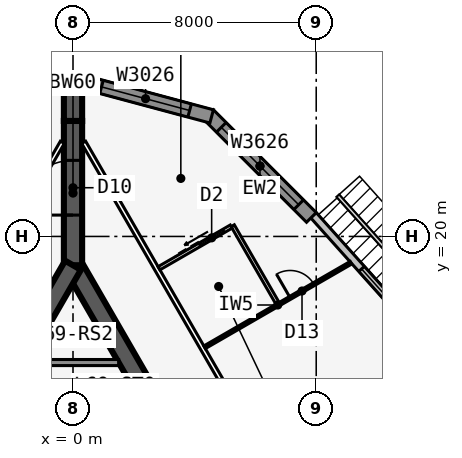
"""IFC4 building model, lengths in metres.
Left out: names, types, materials, properties, quantities, classifications, styles, units other than length and angle.
Written with IfcOpenShell. Run it as: python <this file> out.ifc"""

import sys

from ifc_helpers import new_model, si_unit, direction, frame, frame_2d, origin, place, context, subcontext, project, spatial, polyline, rectangle, outline, extrude, element, fill, save


model = new_model("IFC4")
c1 = context("Model", 3, precision=1e-05, world=origin(), true_north=direction((0.0, 1.0)))
c2 = subcontext(c1, "Body", "Model", "MODEL_VIEW")
j1 = project(units=[si_unit("LENGTHUNIT", "METRE"), si_unit("PLANEANGLEUNIT", "RADIAN")], contexts=[c1])
p1 = place(None, origin())
s1 = spatial("IfcSite", under=j1, at=p1, CompositionType="ELEMENT")
p2 = place(p1, origin())
s2 = spatial("IfcBuilding", under=s1, at=p2, CompositionType="ELEMENT")
p3 = place(p2, frame((0.0, 0.0, 260.9)))
s3 = spatial("IfcBuildingStorey", under=s2, at=p3, CompositionType="ELEMENT", Elevation=260.9)
p4 = place(p3, frame((16.5, -9.526, 0.0), z_axis=(0.0, 0.0, 1.0), x_axis=(-0.499999749417, 0.866025548458, 0.0)))
e1 = element("IfcWall", 1, at=p4, inside=s3, PredefinedType="SHEAR", context=c2, shape_type="SweptSolid", body=[
    extrude(rectangle(XDim=33.0, YDim=0.6, at=frame_2d((16.5, 0.0))), origin(), (0.0, 0.0, 1.0), 3.6),
])
p5 = place(p4, frame((14.15, 0.0, 0.0)))
e2 = element("IfcOpeningElement", 2, at=p5, cuts=e1, PredefinedType="OPENING", context=c2, shape_type="SweptSolid", body=[
    extrude(rectangle(XDim=1.8, YDim=2.13, at=frame_2d((0.9, 1.065))), frame((0.0, 0.31, 0.0), z_axis=(0.0, -1.0, 0.0), x_axis=(1.0, 0.0, 0.0)), (0.0, 0.0, 1.0), 0.62),
])
p6 = place(p4, frame((12.6, 0.0, 0.0)))
e3 = element("IfcOpeningElement", 3, at=p6, cuts=e1, PredefinedType="OPENING", context=c2, shape_type="SweptSolid", body=[
    extrude(rectangle(XDim=1.0, YDim=2.13, at=frame_2d((0.5, 1.065))), frame((0.0, 0.31, 0.0), z_axis=(0.0, -1.0, 0.0), x_axis=(1.0, 0.0, 0.0)), (0.0, 0.0, 1.0), 0.62),
])
p7 = place(p3, frame((0.0, 19.052, 0.0), z_axis=(0.0, 0.0, 1.0), x_axis=(-0.499999749417, -0.866025548458, 0.0)))
e4 = element("IfcWall", 4, at=p7, inside=s3, PredefinedType="SHEAR", context=c2, shape_type="SweptSolid", body=[
    extrude(rectangle(XDim=33.0, YDim=0.6, at=frame_2d((16.5, 0.0))), origin(), (0.0, 0.0, 1.0), 3.6),
])
p8 = place(p7, frame((14.15, 0.0, 0.0)))
e5 = element("IfcOpeningElement", 5, at=p8, cuts=e4, PredefinedType="OPENING", context=c2, shape_type="SweptSolid", body=[
    extrude(rectangle(XDim=1.8, YDim=2.13, at=frame_2d((0.9, 1.065))), frame((0.0, 0.31, 0.0), z_axis=(0.0, -1.0, 0.0), x_axis=(1.0, 0.0, 0.0)), (0.0, 0.0, 1.0), 0.62),
])
p9 = place(p7, frame((12.6, 0.0, 0.0)))
e6 = element("IfcOpeningElement", 6, at=p9, cuts=e4, PredefinedType="OPENING", context=c2, shape_type="SweptSolid", body=[
    extrude(rectangle(XDim=1.0, YDim=2.13, at=frame_2d((0.5, 1.065))), frame((0.0, 0.31, 0.0), z_axis=(0.0, -1.0, 0.0), x_axis=(1.0, 0.0, 0.0)), (0.0, 0.0, 1.0), 0.62),
])
p10 = place(p3, frame((0.0, 19.052, 0.0), z_axis=(0.0, 0.0, 1.0), x_axis=(0.0, 1.0, 0.0)))
e7 = element("IfcWall", 7, at=p10, inside=s3, PredefinedType="SHEAR", context=c2, shape_type="SweptSolid", body=[
    extrude(rectangle(XDim=4.746, YDim=0.6, at=frame_2d((2.373, 0.0))), origin(), (0.0, 0.0, 1.0), 3.6),
])
p11 = place(p10, frame((1.65, 0.0, 0.0)))
e8 = element("IfcOpeningElement", 8, at=p11, cuts=e7, PredefinedType="OPENING", context=c2, shape_type="SweptSolid", body=[
    extrude(rectangle(XDim=1.8, YDim=2.13, at=frame_2d((0.9, 1.065))), frame((0.0, 0.31, 0.0), z_axis=(0.0, -1.0, 0.0), x_axis=(1.0, 0.0, 0.0)), (0.0, 0.0, 1.0), 0.62),
])
p12 = place(p3, frame((0.0, 23.799, 0.0), z_axis=(0.0, 0.0, 1.0), x_axis=(0.0, 1.0, 0.0)))
e9 = element("IfcWall", 9, at=p12, inside=s3, PredefinedType="SHEAR", context=c2, shape_type="SweptSolid", body=[
    extrude(rectangle(XDim=1.155, YDim=0.6, at=frame_2d((0.577, 0.0))), origin(), (0.0, 0.0, 1.0), 3.6),
])
p13 = place(p3, frame((12.68, 15.374, 0.0), z_axis=(0.0, 0.0, 1.0), x_axis=(-0.667303550892, 0.744785855778, 0.0)))
e10 = element("IfcWall", 10, at=p13, inside=s3, PredefinedType="STANDARD", context=c2, shape_type="SweptSolid", body=[
    extrude(rectangle(XDim=7.153, YDim=0.25, at=frame_2d((3.576, 0.0))), origin(), (0.0, 0.0, 1.0), 3.435),
])
p14 = place(p13, frame((0.577, 0.0, 0.45)))
e11 = element("IfcOpeningElement", 11, at=p14, cuts=e10, PredefinedType="OPENING", context=c2, shape_type="SweptSolid", body=[
    extrude(rectangle(XDim=4.2, YDim=2.6, at=frame_2d((2.1, 1.3))), frame((0.0, 0.135, 0.0), z_axis=(0.0, -1.0, 0.0), x_axis=(1.0, 0.0, 0.0)), (0.0, 0.0, 1.0), 0.27),
])
p15 = place(p3, frame((7.841, 20.625, 0.0), z_axis=(0.0, 0.0, 1.0), x_axis=(-0.707106781187, 0.707106781187, 0.0)))
e12 = element("IfcWall", 12, at=p15, inside=s3, PredefinedType="SOLIDWALL", context=c2, shape_type="SweptSolid", body=[
    extrude(rectangle(XDim=4.781, YDim=0.45, at=frame_2d((2.391, 0.0))), origin(), (0.0, 0.0, 1.0), 3.435),
])
p16 = place(p15, frame((0.591, 0.0, 0.45)))
e13 = element("IfcOpeningElement", 13, at=p16, cuts=e12, PredefinedType="OPENING", context=c2, shape_type="SweptSolid", body=[
    extrude(rectangle(XDim=3.6, YDim=2.6, at=frame_2d((1.8, 1.3))), frame((0.0, 0.235, 0.0), z_axis=(0.0, -1.0, 0.0), x_axis=(1.0, 0.0, 0.0)), (0.0, 0.0, 1.0), 0.47),
])
p17 = place(p3, frame((4.561, 23.948, 0.0), z_axis=(0.0, 0.0, 1.0), x_axis=(-0.965926628191, 0.258816052347, 0.0)))
e14 = element("IfcWall", 14, at=p17, inside=s3, PredefinedType="SOLIDWALL", context=c2, shape_type="SweptSolid", body=[
    extrude(outline(polyline([(4.781, 0.225), (4.722, 0.225), (4.375, 0.132), (4.351, 0.225), (0.0, 0.225), (0.0, -0.225), (4.781, -0.225), (4.781, 0.225)])), origin(), (0.0, 0.0, 1.0), 3.435),
])
p18 = place(p17, frame((0.75, 0.0, 0.45)))
e15 = element("IfcOpeningElement", 15, at=p18, cuts=e14, PredefinedType="OPENING", context=c2, shape_type="SweptSolid", body=[
    extrude(rectangle(XDim=3.0, YDim=2.6, at=frame_2d((1.5, 1.3))), frame((0.0, 0.235, 0.0), z_axis=(0.0, -1.0, 0.0), x_axis=(1.0, 0.0, 0.0)), (0.0, 0.0, 1.0), 0.47),
])
p19 = place(p3, frame((0.058, 25.186, 0.0), z_axis=(0.0, 0.0, 1.0), x_axis=(-0.965926628191, -0.258816052347, 0.0)))
e16 = element("IfcWall", 16, at=p19, inside=s3, PredefinedType="SOLIDWALL", context=c2, shape_type="SweptSolid", body=[
    extrude(outline(polyline([(4.781, 0.225), (0.431, 0.225), (0.406, 0.132), (0.059, 0.225), (0.0, 0.225), (0.0, -0.225), (4.781, -0.225), (4.781, 0.225)])), origin(), (0.0, 0.0, 1.0), 3.435),
])
p20 = place(p19, frame((1.031, 0.0, 0.45)))
e17 = element("IfcOpeningElement", 17, at=p20, cuts=e16, PredefinedType="OPENING", context=c2, shape_type="SweptSolid", body=[
    extrude(rectangle(XDim=3.0, YDim=2.6, at=frame_2d((1.5, 1.3))), frame((0.0, 0.235, 0.0), z_axis=(0.0, -1.0, 0.0), x_axis=(1.0, 0.0, 0.0)), (0.0, 0.0, 1.0), 0.47),
])
p21 = place(p3, frame((20.177, -11.245, 0.0), z_axis=(0.0, 0.0, 1.0), x_axis=(-0.499998875317, 0.866026053119, 0.0)))
e18 = element("IfcWall", 18, at=p21, inside=s3, PredefinedType="PARTITIONING", context=c2, shape_type="SweptSolid", body=[
    extrude(rectangle(XDim=39.654, YDim=0.15, at=frame_2d((19.827, 0.0))), origin(), (0.0, 0.0, 1.0), 3.435),
])
p22 = place(p21, frame((10.352, 0.0, 0.0)))
e19 = element("IfcOpeningElement", 19, at=p22, cuts=e18, PredefinedType="OPENING", context=c2, shape_type="SweptSolid", body=[
    extrude(rectangle(XDim=0.95, YDim=2.13, at=frame_2d((0.475, 1.065))), frame((0.0, 0.085, 0.0), z_axis=(0.0, -1.0, 0.0), x_axis=(1.0, 0.0, 0.0)), (0.0, 0.0, 1.0), 0.17),
])
p23 = place(p3, frame((4.329, 16.355, 0.0), z_axis=(0.0, 0.0, 1.0), x_axis=(0.866029066823, 0.499993655377, 0.0)))
e20 = element("IfcWall", 20, at=p23, inside=s3, PredefinedType="PARTITIONING", context=c2, shape_type="SweptSolid", body=[
    extrude(rectangle(XDim=5.559, YDim=0.1, at=frame_2d((2.779, 0.0))), origin(), (0.0, 0.0, 1.0), 2.823),
])
p24 = place(p23, frame((3.25, 0.0, 0.0)))
e21 = element("IfcOpeningElement", 21, at=p24, cuts=e20, PredefinedType="OPENING", context=c2, shape_type="SweptSolid", body=[
    extrude(rectangle(XDim=0.9, YDim=2.13, at=frame_2d((0.45, 1.065))), frame((0.0, 0.06, 0.0), z_axis=(0.0, -1.0, 0.0), x_axis=(1.0, 0.0, 0.0)), (0.0, 0.0, 1.0), 0.12),
])
p25 = place(p3, frame((6.753, 17.755, 0.0), z_axis=(0.0, 0.0, 1.0), x_axis=(-0.499990139034, 0.866031096941, 0.0)))
e22 = element("IfcWall", 22, at=p25, inside=s3, PredefinedType="PLUMBINGWALL", context=c2, shape_type="SweptSolid", body=[
    extrude(rectangle(XDim=3.0, YDim=0.12, at=frame_2d((1.5, 0.0))), origin(), (0.0, 0.0, 1.0), 3.435),
])
p26 = place(p3, frame((2.829, 18.954, 0.0), z_axis=(0.0, 0.0, 1.0), x_axis=(0.866035715982, 0.499982138324, 0.0)))
e23 = element("IfcWall", 23, at=p26, inside=s3, PredefinedType="PLUMBINGWALL", context=c2, shape_type="SweptSolid", body=[
    extrude(rectangle(XDim=2.74, YDim=0.12, at=frame_2d((1.37, 0.0))), origin(), (0.0, 0.0, 1.0), 3.435),
])
p27 = place(p26, frame((1.55, 0.0, 0.0)))
e24 = element("IfcOpeningElement", 24, at=p27, cuts=e23, PredefinedType="OPENING", context=c2, shape_type="SweptSolid", body=[
    extrude(rectangle(XDim=0.9, YDim=2.13, at=frame_2d((0.45, 1.065))), frame((0.0, 0.07, 0.0), z_axis=(0.0, -1.0, 0.0), x_axis=(1.0, 0.0, 0.0)), (0.0, 0.0, 1.0), 0.14),
])
p28 = place(p3, frame((-0.35, 23.096, 0.0), z_axis=(0.0, 0.0, 1.0), x_axis=(-0.499996044987, -0.8660276872, 0.0)))
e25 = element("IfcWall", 25, at=p28, inside=s3, PredefinedType="PARTITIONING", context=c2, shape_type="SweptSolid", body=[
    extrude(rectangle(XDim=13.827, YDim=0.15, at=frame_2d((6.913, 0.0))), origin(), (0.0, 0.0, 1.0), 3.435),
])
p29 = place(p28, frame((3.652, 0.0, 0.0)))
e26 = element("IfcOpeningElement", 26, at=p29, cuts=e25, PredefinedType="OPENING", context=c2, shape_type="SweptSolid", body=[
    extrude(rectangle(XDim=0.95, YDim=2.13, at=frame_2d((0.475, 1.065))), frame((0.0, 0.085, 0.0), z_axis=(0.0, -1.0, 0.0), x_axis=(1.0, 0.0, 0.0)), (0.0, 0.0, 1.0), 0.17),
])
p30 = place(p28, frame((11.052, 0.0, 0.0)))
e27 = element("IfcOpeningElement", 27, at=p30, cuts=e25, PredefinedType="OPENING", context=c2, shape_type="SweptSolid", body=[
    extrude(rectangle(XDim=0.95, YDim=2.13, at=frame_2d((0.475, 1.065))), frame((0.0, 0.085, 0.0), z_axis=(0.0, -1.0, 0.0), x_axis=(1.0, 0.0, 0.0)), (0.0, 0.0, 1.0), 0.17),
])
p31 = place(p3, frame((-1.501, 15.853, 0.0), z_axis=(0.0, 0.0, 1.0), x_axis=(1.0, 0.0, 0.0)))
e28 = element("IfcWall", 28, at=p31, inside=s3, PredefinedType="SOLIDWALL", context=c2, shape_type="SweptSolid", body=[
    extrude(rectangle(XDim=3.002, YDim=0.2, at=frame_2d((1.501, 0.0))), origin(), (0.0, 0.0, 1.0), 3.435),
])
p32 = place(p14, origin())
e29 = element("IfcWindow", 29, at=p32, inside=s3, PartitioningType="SINGLE_PANEL", PredefinedType="WINDOW", context=c2, shape_type="SweptSolid", body=[
    extrude(rectangle(XDim=4.2, YDim=2.6, at=frame_2d((2.1, 1.3))), frame((0.0, 0.03, 0.0), z_axis=(0.0, -1.0, 0.0), x_axis=(1.0, 0.0, 0.0)), (0.0, 0.0, 1.0), 0.06),
])
fill(e11, e29)
p33 = place(p16, origin())
e30 = element("IfcWindow", 30, at=p33, inside=s3, PartitioningType="SINGLE_PANEL", PredefinedType="WINDOW", context=c2, shape_type="SweptSolid", body=[
    extrude(rectangle(XDim=3.6, YDim=2.6, at=frame_2d((1.8, 1.3))), frame((0.0, 0.03, 0.0), z_axis=(0.0, -1.0, 0.0), x_axis=(1.0, 0.0, 0.0)), (0.0, 0.0, 1.0), 0.06),
])
fill(e13, e30)
p34 = place(p18, origin())
e31 = element("IfcWindow", 31, at=p34, inside=s3, PartitioningType="SINGLE_PANEL", PredefinedType="WINDOW", context=c2, shape_type="SweptSolid", body=[
    extrude(rectangle(XDim=3.0, YDim=2.6, at=frame_2d((1.5, 1.3))), frame((0.0, 0.03, 0.0), z_axis=(0.0, -1.0, 0.0), x_axis=(1.0, 0.0, 0.0)), (0.0, 0.0, 1.0), 0.06),
])
fill(e15, e31)
p35 = place(p24, origin())
e32 = element("IfcDoor", 32, at=p35, inside=s3, OperationType="SINGLE_SWING_LEFT", PredefinedType="DOOR", context=c2, shape_type="SweptSolid", body=[
    extrude(rectangle(XDim=0.9, YDim=2.13, at=frame_2d((0.45, 1.065))), frame((0.0, 0.025, 0.0), z_axis=(0.0, -1.0, 0.0), x_axis=(1.0, 0.0, 0.0)), (0.0, 0.0, 1.0), 0.05),
])
fill(e21, e32)
p36 = place(p27, origin())
e33 = element("IfcDoor", 33, at=p36, inside=s3, OperationType="SLIDING_TO_LEFT", PredefinedType="DOOR", context=c2, shape_type="SweptSolid", body=[
    extrude(rectangle(XDim=0.9, YDim=2.13, at=frame_2d((0.45, 1.065))), frame((0.0, 0.025, 0.0), z_axis=(0.0, -1.0, 0.0), x_axis=(1.0, 0.0, 0.0)), (0.0, 0.0, 1.0), 0.05),
])
fill(e24, e33)
p37 = place(p11, origin())
e34 = element("IfcDoor", 34, at=p37, inside=s3, OperationType="DOUBLE_DOOR_DOUBLE_SWING", PredefinedType="DOOR", context=c2, shape_type="SweptSolid", body=[
    extrude(rectangle(XDim=1.8, YDim=2.13, at=frame_2d((0.9, 1.065))), frame((0.0, 0.025, 0.0), z_axis=(0.0, -1.0, 0.0), x_axis=(1.0, 0.0, 0.0)), (0.0, 0.0, 1.0), 0.05),
])
fill(e8, e34)
save(model, sys.argv[1])
